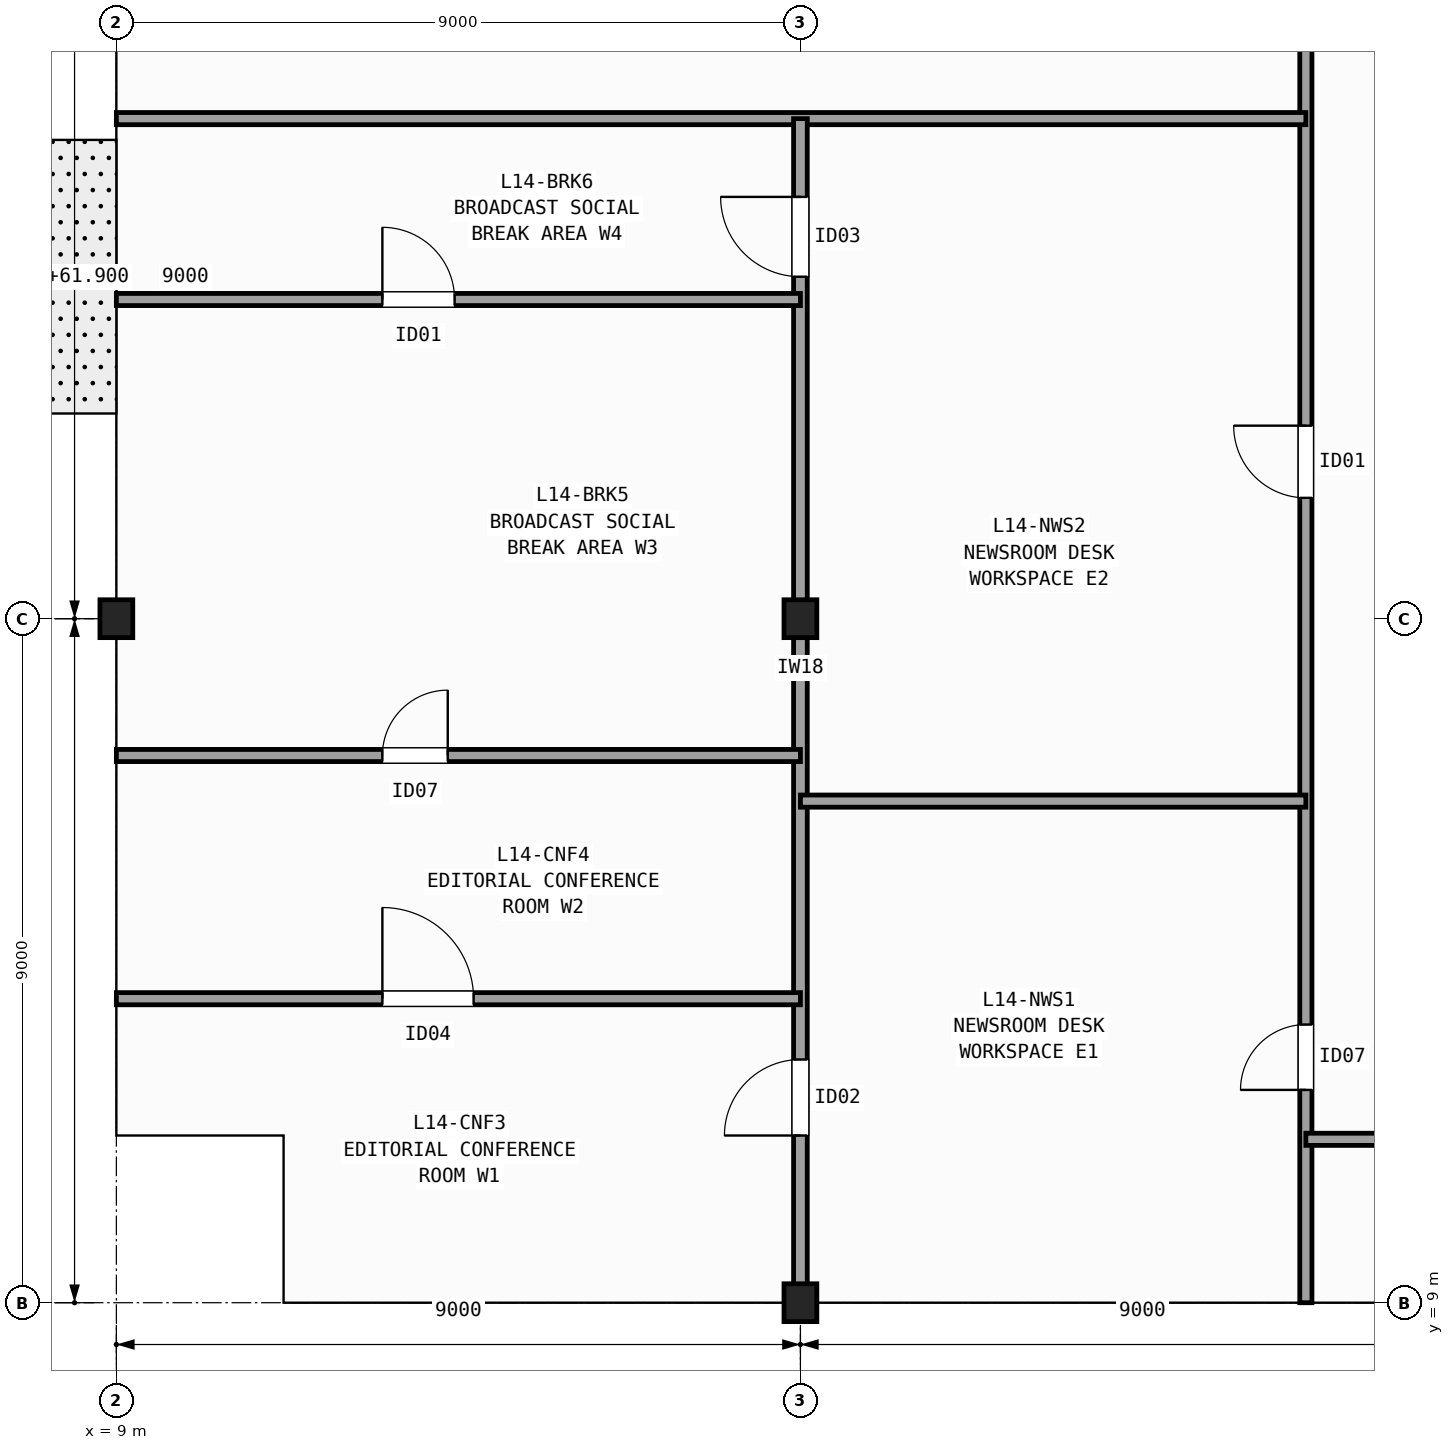
"""IFC4 building model, lengths in metres.
Left out: names, types, materials, properties, quantities, classifications, styles, units other than length and angle.
Written with IfcOpenShell. Run it as: python <this file> out.ifc"""

import sys

from ifc_helpers import new_model, si_unit, direction, frame, frame_2d, origin, origin_2d, place, context, subcontext, project, spatial, rectangle, i_section, extrude, element, fill, save


model = new_model("IFC4")
c1 = context("Model", 3, precision=1e-05, world=origin(), true_north=direction((0.0, 1.0)))
c2 = subcontext(c1, "Body", "Model", "MODEL_VIEW")
j1 = project(units=[si_unit("LENGTHUNIT", "METRE"), si_unit("PLANEANGLEUNIT", "RADIAN")], contexts=[c1])
p1 = place(None, origin())
s1 = spatial("IfcSite", under=j1, at=p1, CompositionType="ELEMENT")
p2 = place(p1, origin())
s2 = spatial("IfcBuilding", under=s1, at=p2, CompositionType="ELEMENT")
p3 = place(p2, frame((0.0, 0.0, 61.9)))
s3 = spatial("IfcBuildingStorey", under=s2, at=p3, CompositionType="ELEMENT", Elevation=61.9)
for number, where, z_axis, x_axis in (
    (1, (9.0, 18.0, 0.0), (0.0, 0.0, 1.0), (1.0, 0.0, 0.0)),
    (2, (18.0, 9.0, 0.0), (0.0, 0.0, 1.0), (1.0, 0.0, 0.0)),
    (3, (18.0, 18.0, 0.0), (0.0, 0.0, 1.0), (1.0, 0.0, 0.0)),
):
    element("IfcColumn", number, at=place(p3, frame(where, z_axis=z_axis, x_axis=x_axis)), inside=s3, PredefinedType="COLUMN", context=c2, shape_type="SweptSolid", body=[
        extrude(i_section(OverallWidth=0.432, OverallDepth=0.498, WebThickness=0.056, FlangeThickness=0.089, FilletRadius=0.015, at=origin_2d()), origin(), (0.0, 0.0, 1.0), 3.7),
    ])
p4 = place(p3, frame((24.65, 9.0, 0.0), z_axis=(0.0, 0.0, 1.0), x_axis=(0.0, 1.0, 0.0)))
e4 = element("IfcWall", 4, at=p4, inside=s3, PredefinedType="PARTITIONING", context=c2, shape_type="SweptSolid", body=[
    extrude(rectangle(XDim=19.2, YDim=0.16, at=frame_2d((9.6, 0.0))), origin(), (0.0, 0.0, 1.0), 2.627),
])
p5 = place(p4, frame((2.8, 0.0, 0.0)))
e5 = element("IfcOpeningElement", 5, at=p5, cuts=e4, PredefinedType="OPENING", context=c2, shape_type="SweptSolid", body=[
    extrude(rectangle(XDim=0.86, YDim=2.05, at=frame_2d((0.43, 1.025))), frame((0.0, 0.09, 0.0), z_axis=(0.0, -1.0, 0.0), x_axis=(1.0, 0.0, 0.0)), (0.0, 0.0, 1.0), 0.18),
])
p6 = place(p4, frame((10.59, 0.0, 0.0)))
e6 = element("IfcOpeningElement", 6, at=p6, cuts=e4, PredefinedType="OPENING", context=c2, shape_type="SweptSolid", body=[
    extrude(rectangle(XDim=0.95, YDim=2.1, at=frame_2d((0.475, 1.05))), frame((0.0, 0.09, 0.0), z_axis=(0.0, -1.0, 0.0), x_axis=(1.0, 0.0, 0.0)), (0.0, 0.0, 1.0), 0.18),
])
p7 = place(p3, frame((9.0, 24.58, 0.0), z_axis=(0.0, 0.0, 1.0), x_axis=(1.0, 0.0, 0.0)))
e7 = element("IfcWall", 7, at=p7, inside=s3, PredefinedType="PARTITIONING", context=c2, shape_type="SweptSolid", body=[
    extrude(rectangle(XDim=15.65, YDim=0.16, at=frame_2d((7.825, 0.0))), origin(), (0.0, 0.0, 1.0), 2.627),
])
p8 = place(p3, frame((18.0, 9.0, 0.0), z_axis=(0.0, 0.0, 1.0), x_axis=(0.0, 1.0, 0.0)))
e8 = element("IfcWall", 8, at=p8, inside=s3, PredefinedType="PARTITIONING", context=c2, shape_type="SweptSolid", body=[
    extrude(rectangle(XDim=15.58, YDim=0.18, at=frame_2d((7.79, 0.0))), origin(), (0.0, 0.0, 1.0), 2.627),
])
p9 = place(p8, frame((2.2, 0.0, 0.0)))
e9 = element("IfcOpeningElement", 9, at=p9, cuts=e8, PredefinedType="OPENING", context=c2, shape_type="SweptSolid", body=[
    extrude(rectangle(XDim=1.0, YDim=2.1, at=frame_2d((0.5, 1.05))), frame((0.0, 0.1, 0.0), z_axis=(0.0, -1.0, 0.0), x_axis=(1.0, 0.0, 0.0)), (0.0, 0.0, 1.0), 0.2),
])
p10 = place(p8, frame((13.5, 0.0, 0.0)))
e10 = element("IfcOpeningElement", 10, at=p10, cuts=e8, PredefinedType="OPENING", context=c2, shape_type="SweptSolid", body=[
    extrude(rectangle(XDim=1.05, YDim=2.15, at=frame_2d((0.525, 1.075))), frame((0.0, 0.1, 0.0), z_axis=(0.0, -1.0, 0.0), x_axis=(1.0, 0.0, 0.0)), (0.0, 0.0, 1.0), 0.2),
])
p11 = place(p3, frame((18.0, 15.6, 0.0), z_axis=(0.0, 0.0, 1.0), x_axis=(1.0, 0.0, 0.0)))
e11 = element("IfcWall", 11, at=p11, inside=s3, PredefinedType="PARTITIONING", context=c2, shape_type="SweptSolid", body=[
    extrude(rectangle(XDim=6.65, YDim=0.16, at=frame_2d((3.325, 0.0))), origin(), (0.0, 0.0, 1.0), 2.789),
])
p12 = place(p3, frame((9.0, 13.0, 0.0), z_axis=(0.0, 0.0, 1.0), x_axis=(1.0, 0.0, 0.0)))
e12 = element("IfcWall", 12, at=p12, inside=s3, PredefinedType="PARTITIONING", context=c2, shape_type="SweptSolid", body=[
    extrude(rectangle(XDim=9.0, YDim=0.16, at=frame_2d((4.5, 0.0))), origin(), (0.0, 0.0, 1.0), 2.792),
])
p13 = place(p12, frame((3.5, 0.0, 0.0)))
e13 = element("IfcOpeningElement", 13, at=p13, cuts=e12, PredefinedType="OPENING", context=c2, shape_type="SweptSolid", body=[
    extrude(rectangle(XDim=1.2, YDim=2.15, at=frame_2d((0.6, 1.075))), frame((0.0, 0.09, 0.0), z_axis=(0.0, -1.0, 0.0), x_axis=(1.0, 0.0, 0.0)), (0.0, 0.0, 1.0), 0.18),
])
p14 = place(p3, frame((9.0, 16.2, 0.0), z_axis=(0.0, 0.0, 1.0), x_axis=(1.0, 0.0, 0.0)))
e14 = element("IfcWall", 14, at=p14, inside=s3, PredefinedType="PARTITIONING", context=c2, shape_type="SweptSolid", body=[
    extrude(rectangle(XDim=9.0, YDim=0.16, at=frame_2d((4.5, 0.0))), origin(), (0.0, 0.0, 1.0), 2.792),
])
p15 = place(p14, frame((3.5, 0.0, 0.0)))
e15 = element("IfcOpeningElement", 15, at=p15, cuts=e14, PredefinedType="OPENING", context=c2, shape_type="SweptSolid", body=[
    extrude(rectangle(XDim=0.86, YDim=2.05, at=frame_2d((0.43, 1.025))), frame((0.0, 0.09, 0.0), z_axis=(0.0, -1.0, 0.0), x_axis=(1.0, 0.0, 0.0)), (0.0, 0.0, 1.0), 0.18),
])
p16 = place(p3, frame((9.0, 22.2, 0.0), z_axis=(0.0, 0.0, 1.0), x_axis=(1.0, 0.0, 0.0)))
e16 = element("IfcWall", 16, at=p16, inside=s3, PredefinedType="PARTITIONING", context=c2, shape_type="SweptSolid", body=[
    extrude(rectangle(XDim=9.0, YDim=0.16, at=frame_2d((4.5, 0.0))), origin(), (0.0, 0.0, 1.0), 2.627),
])
p17 = place(p16, frame((3.5, 0.0, 0.0)))
e17 = element("IfcOpeningElement", 17, at=p17, cuts=e16, PredefinedType="OPENING", context=c2, shape_type="SweptSolid", body=[
    extrude(rectangle(XDim=0.95, YDim=2.1, at=frame_2d((0.475, 1.05))), frame((0.0, 0.09, 0.0), z_axis=(0.0, -1.0, 0.0), x_axis=(1.0, 0.0, 0.0)), (0.0, 0.0, 1.0), 0.18),
])
p18 = place(p3, frame((24.65, 11.15, 0.0), z_axis=(0.0, 0.0, 1.0), x_axis=(1.0, 0.0, 0.0)))
e18 = element("IfcWall", 18, at=p18, inside=s3, PredefinedType="PARTITIONING", context=c2, shape_type="SweptSolid", body=[
    extrude(rectangle(XDim=4.75, YDim=0.16, at=frame_2d((2.375, 0.0))), origin(), (0.0, 0.0, 1.0), 2.792),
])
p19 = place(p18, frame((1.2, 0.0, 0.0)))
e19 = element("IfcOpeningElement", 19, at=p19, cuts=e18, PredefinedType="OPENING", context=c2, shape_type="SweptSolid", body=[
    extrude(rectangle(XDim=0.86, YDim=2.05, at=frame_2d((0.43, 1.025))), frame((0.0, 0.09, 0.0), z_axis=(0.0, -1.0, 0.0), x_axis=(1.0, 0.0, 0.0)), (0.0, 0.0, 1.0), 0.18),
])
p20 = place(p5, origin())
e20 = element("IfcDoor", 20, at=p20, inside=s3, OperationType="SINGLE_SWING_LEFT", PredefinedType="DOOR", context=c2, shape_type="SweptSolid", body=[
    extrude(rectangle(XDim=0.86, YDim=2.05, at=frame_2d((0.43, 1.025))), frame((0.0, 0.025, 0.0), z_axis=(0.0, -1.0, 0.0), x_axis=(1.0, 0.0, 0.0)), (0.0, 0.0, 1.0), 0.05),
])
fill(e5, e20)
p21 = place(p6, origin())
e21 = element("IfcDoor", 21, at=p21, inside=s3, OperationType="SINGLE_SWING_RIGHT", PredefinedType="DOOR", context=c2, shape_type="SweptSolid", body=[
    extrude(rectangle(XDim=0.95, YDim=2.1, at=frame_2d((0.475, 1.05))), frame((0.0, 0.025, 0.0), z_axis=(0.0, -1.0, 0.0), x_axis=(1.0, 0.0, 0.0)), (0.0, 0.0, 1.0), 0.05),
])
fill(e6, e21)
p22 = place(p9, origin())
e22 = element("IfcDoor", 22, at=p22, inside=s3, OperationType="SINGLE_SWING_LEFT", PredefinedType="DOOR", context=c2, shape_type="SweptSolid", body=[
    extrude(rectangle(XDim=1.0, YDim=2.1, at=frame_2d((0.5, 1.05))), frame((0.0, 0.025, 0.0), z_axis=(0.0, -1.0, 0.0), x_axis=(1.0, 0.0, 0.0)), (0.0, 0.0, 1.0), 0.05),
])
fill(e9, e22)
p23 = place(p10, origin())
e23 = element("IfcDoor", 23, at=p23, inside=s3, OperationType="SINGLE_SWING_RIGHT", PredefinedType="DOOR", context=c2, shape_type="SweptSolid", body=[
    extrude(rectangle(XDim=1.05, YDim=2.15, at=frame_2d((0.525, 1.075))), frame((0.0, 0.025, 0.0), z_axis=(0.0, -1.0, 0.0), x_axis=(1.0, 0.0, 0.0)), (0.0, 0.0, 1.0), 0.05),
])
fill(e10, e23)
p24 = place(p13, origin())
e24 = element("IfcDoor", 24, at=p24, inside=s3, OperationType="SINGLE_SWING_LEFT", PredefinedType="DOOR", context=c2, shape_type="SweptSolid", body=[
    extrude(rectangle(XDim=1.2, YDim=2.15, at=frame_2d((0.6, 1.075))), frame((0.0, 0.025, 0.0), z_axis=(0.0, -1.0, 0.0), x_axis=(1.0, 0.0, 0.0)), (0.0, 0.0, 1.0), 0.05),
])
fill(e13, e24)
p25 = place(p15, origin())
e25 = element("IfcDoor", 25, at=p25, inside=s3, OperationType="SINGLE_SWING_RIGHT", PredefinedType="DOOR", context=c2, shape_type="SweptSolid", body=[
    extrude(rectangle(XDim=0.86, YDim=2.05, at=frame_2d((0.43, 1.025))), frame((0.0, 0.025, 0.0), z_axis=(0.0, -1.0, 0.0), x_axis=(1.0, 0.0, 0.0)), (0.0, 0.0, 1.0), 0.05),
])
fill(e15, e25)
p26 = place(p17, origin())
e26 = element("IfcDoor", 26, at=p26, inside=s3, OperationType="SINGLE_SWING_LEFT", PredefinedType="DOOR", context=c2, shape_type="SweptSolid", body=[
    extrude(rectangle(XDim=0.95, YDim=2.1, at=frame_2d((0.475, 1.05))), frame((0.0, 0.025, 0.0), z_axis=(0.0, -1.0, 0.0), x_axis=(1.0, 0.0, 0.0)), (0.0, 0.0, 1.0), 0.05),
])
fill(e17, e26)
save(model, sys.argv[1])
